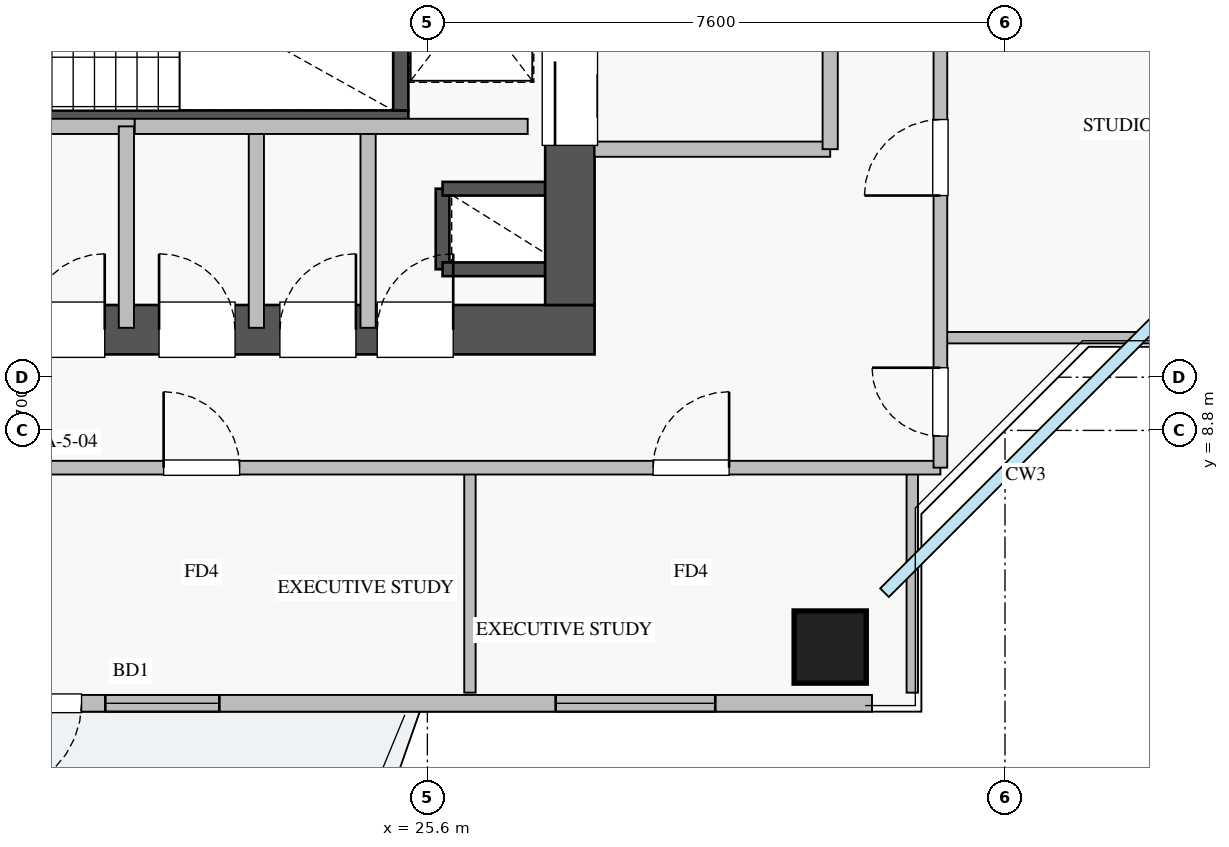
"""IFC4 building model, lengths in metres.
Left out: names, types, materials, properties, quantities, classifications, styles, units other than length and angle.
Written with IfcOpenShell. Run it as: python <this file> out.ifc"""

import sys

from ifc_helpers import new_model, si_unit, direction, frame, frame_2d, origin, origin_2d, place, context, subcontext, project, spatial, rectangle, extrude, source, transform, mapped, element, fill, save


model = new_model("IFC4")
c1 = context("Model", 3, precision=1e-05, world=origin(), true_north=direction((0.0, 1.0)))
c2 = subcontext(c1, "Body", "Model", "MODEL_VIEW")
j1 = project(units=[si_unit("LENGTHUNIT", "METRE"), si_unit("PLANEANGLEUNIT", "RADIAN")], contexts=[c1])
p1 = place(None, origin())
s1 = spatial("IfcSite", under=j1, at=p1, CompositionType="ELEMENT")
p2 = place(p1, origin())
s2 = spatial("IfcBuilding", under=s1, at=p2, CompositionType="ELEMENT")
p3 = place(p2, frame((0.0, 0.0, 182.75)))
s3 = spatial("IfcBuildingStorey", under=s2, at=p3, CompositionType="ELEMENT", Elevation=182.75)
p4 = place(p3, frame((25.8, 10.92, 0.0), z_axis=(0.0, 0.0, 1.0), x_axis=(0.0, 1.0, 0.0)))
e1 = element("IfcWall", 1, at=p4, inside=s3, PredefinedType="SHEAR", context=c2, shape_type="SweptSolid", body=[
    extrude(rectangle(XDim=1.06, YDim=0.18, at=frame_2d((0.53, 0.0))), origin(), (0.0, 0.0, 1.0), 3.03),
])
for number, where, z_axis, x_axis in (
    (2, (25.8, 11.98, 0.0), (0.0, 0.0, 1.0), (1.0, 0.0, 0.0)),
    (3, (25.8, 10.92, 0.0), (0.0, 0.0, 1.0), (1.0, 0.0, 0.0)),
):
    element("IfcWall", number, at=place(p3, frame(where, z_axis=z_axis, x_axis=x_axis)), inside=s3, PredefinedType="SHEAR", context=c2, shape_type="SweptSolid", body=[
        extrude(rectangle(XDim=1.35, YDim=0.18, at=frame_2d((0.675, 0.0))), origin(), (0.0, 0.0, 1.0), 3.03),
    ])
p5 = place(p3, frame((18.2, 12.91, 0.0), z_axis=(0.0, 0.0, 1.0), x_axis=(1.0, 0.0, 0.0)))
e4 = element("IfcWall", 4, at=p5, inside=s3, PredefinedType="SHEAR", context=c2, shape_type="SweptSolid", body=[
    extrude(rectangle(XDim=7.15, YDim=0.2, at=frame_2d((3.575, 0.0))), origin(), (0.0, 0.0, 1.0), 3.25),
])
p6 = place(p5, frame((0.35, 0.0, 0.0)))
e5 = element("IfcOpeningElement", 5, at=p6, cuts=e4, PredefinedType="OPENING", context=c2, shape_type="SweptSolid", body=[
    extrude(rectangle(XDim=1.1, YDim=2.05, at=frame_2d((0.55, 1.025))), frame((0.0, 0.11, 0.0), z_axis=(0.0, -1.0, 0.0), x_axis=(1.0, 0.0, 0.0)), (0.0, 0.0, 1.0), 0.22),
])
p7 = place(p3, frame((25.25, 13.01, 0.0), z_axis=(0.0, 0.0, 1.0), x_axis=(0.0, 1.0, 0.0)))
e6 = element("IfcWall", 6, at=p7, inside=s3, PredefinedType="SHEAR", context=c2, shape_type="SweptSolid", body=[
    extrude(rectangle(XDim=2.94, YDim=0.2, at=frame_2d((1.47, 0.0))), origin(), (0.0, 0.0, 1.0), 3.25),
])
p8 = place(p3, frame((10.2, 10.125, 0.0), z_axis=(0.0, 0.0, 1.0), x_axis=(1.0, 0.0, 0.0)))
e7 = element("IfcWall", 7, at=p8, inside=s3, PredefinedType="SHEAR", context=c2, shape_type="SweptSolid", body=[
    extrude(rectangle(XDim=17.6, YDim=0.65, at=frame_2d((8.8, 0.0))), origin(), (0.0, 0.0, 1.0), 3.25),
])
p9 = place(p8, frame((1.15, 0.0, 0.0)))
e8 = element("IfcOpeningElement", 8, at=p9, cuts=e7, PredefinedType="OPENING", context=c2, shape_type="SweptSolid", body=[
    extrude(rectangle(XDim=1.1, YDim=2.05, at=frame_2d((0.55, 1.025))), frame((0.0, 0.335, 0.0), z_axis=(0.0, -1.0, 0.0), x_axis=(1.0, 0.0, 0.0)), (0.0, 0.0, 1.0), 0.67),
])
p10 = place(p8, frame((8.3, 0.0, 0.0)))
e9 = element("IfcOpeningElement", 9, at=p10, cuts=e7, PredefinedType="OPENING", context=c2, shape_type="SweptSolid", body=[
    extrude(rectangle(XDim=1.1, YDim=2.05, at=frame_2d((0.55, 1.025))), frame((0.0, 0.335, 0.0), z_axis=(0.0, -1.0, 0.0), x_axis=(1.0, 0.0, 0.0)), (0.0, 0.0, 1.0), 0.67),
])
p11 = place(p8, frame((4.9, 0.0, 0.0)))
e10 = element("IfcOpeningElement", 10, at=p11, cuts=e7, PredefinedType="OPENING", context=c2, shape_type="SweptSolid", body=[
    extrude(rectangle(XDim=1.1, YDim=2.05, at=frame_2d((0.55, 1.025))), frame((0.0, 0.335, 0.0), z_axis=(0.0, -1.0, 0.0), x_axis=(1.0, 0.0, 0.0)), (0.0, 0.0, 1.0), 0.67),
])
p12 = place(p8, frame((14.74, 0.0, 0.0)))
e11 = element("IfcOpeningElement", 11, at=p12, cuts=e7, PredefinedType="OPENING", context=c2, shape_type="SweptSolid", body=[
    extrude(rectangle(XDim=1.0, YDim=2.05, at=frame_2d((0.5, 1.025))), frame((0.0, 0.335, 0.0), z_axis=(0.0, -1.0, 0.0), x_axis=(1.0, 0.0, 0.0)), (0.0, 0.0, 1.0), 0.67),
])
p13 = place(p8, frame((10.155, 0.0, 0.0)))
e12 = element("IfcOpeningElement", 12, at=p13, cuts=e7, PredefinedType="OPENING", context=c2, shape_type="SweptSolid", body=[
    extrude(rectangle(XDim=1.0, YDim=2.05, at=frame_2d((0.5, 1.025))), frame((0.0, 0.335, 0.0), z_axis=(0.0, -1.0, 0.0), x_axis=(1.0, 0.0, 0.0)), (0.0, 0.0, 1.0), 0.67),
])
p14 = place(p8, frame((11.87, 0.0, 0.0)))
e13 = element("IfcOpeningElement", 13, at=p14, cuts=e7, PredefinedType="OPENING", context=c2, shape_type="SweptSolid", body=[
    extrude(rectangle(XDim=1.0, YDim=2.05, at=frame_2d((0.5, 1.025))), frame((0.0, 0.335, 0.0), z_axis=(0.0, -1.0, 0.0), x_axis=(1.0, 0.0, 0.0)), (0.0, 0.0, 1.0), 0.67),
])
p15 = place(p8, frame((13.46, 0.0, 0.0)))
e14 = element("IfcOpeningElement", 14, at=p15, cuts=e7, PredefinedType="OPENING", context=c2, shape_type="SweptSolid", body=[
    extrude(rectangle(XDim=1.0, YDim=2.05, at=frame_2d((0.5, 1.025))), frame((0.0, 0.335, 0.0), z_axis=(0.0, -1.0, 0.0), x_axis=(1.0, 0.0, 0.0)), (0.0, 0.0, 1.0), 0.67),
])
p16 = place(p3, frame((27.475, 10.45, 0.0), z_axis=(0.0, 0.0, 1.0), x_axis=(0.0, 1.0, 0.0)))
e15 = element("IfcWall", 15, at=p16, inside=s3, PredefinedType="SHEAR", context=c2, shape_type="SweptSolid", body=[
    extrude(rectangle(XDim=5.9, YDim=0.65, at=frame_2d((2.95, 0.0))), origin(), (0.0, 0.0, 1.0), 3.25),
])
p17 = place(p16, frame((2.1, 0.0, 0.0)))
e16 = element("IfcOpeningElement", 16, at=p17, cuts=e15, PredefinedType="OPENING", context=c2, shape_type="SweptSolid", body=[
    extrude(rectangle(XDim=1.3, YDim=2.05, at=frame_2d((0.65, 1.025))), frame((0.0, 0.335, 0.0), z_axis=(0.0, -1.0, 0.0), x_axis=(1.0, 0.0, 0.0)), (0.0, 0.0, 1.0), 0.67),
])
m1 = source(origin(), c2, "Body", "SweptSolid", [
    extrude(rectangle(XDim=0.95, YDim=0.95, at=origin_2d()), origin(), (0.0, 0.0, 1.0), 3.25),
])
p18 = place(p3, frame((30.9, 5.95, 0.0), z_axis=(0.0, 0.0, 1.0), x_axis=(1.0, 0.0, 0.0)))
e17 = element("IfcColumn", 17, at=p18, inside=s3, PredefinedType="COLUMN", context=c2, shape_type="MappedRepresentation", body=[
    mapped(m1, transform((0.0, 0.0, 0.0), x_axis=(1.0, 0.0, 0.0), y_axis=(0.0, 1.0, 0.0), z_axis=(0.0, 0.0, 1.0), scale=1.0)),
])
p19 = place(p3, frame((6.55, 5.21, 0.0), z_axis=(0.0, 0.0, 1.0), x_axis=(1.0, 0.0, 0.0)))
e18 = element("IfcWall", 18, at=p19, inside=s3, PredefinedType="STANDARD", context=c2, shape_type="SweptSolid", body=[
    extrude(rectangle(XDim=24.9, YDim=0.22, at=frame_2d((12.45, 0.0))), origin(), (0.0, 0.0, 1.0), 2.57),
])
p20 = place(p19, frame((13.3, 0.0, 0.0)))
e19 = element("IfcOpeningElement", 19, at=p20, cuts=e18, PredefinedType="OPENING", context=c2, shape_type="SweptSolid", body=[
    extrude(rectangle(XDim=1.2, YDim=2.1, at=frame_2d((0.6, 1.05))), frame((0.0, 0.12, 0.0), z_axis=(0.0, -1.0, 0.0), x_axis=(1.0, 0.0, 0.0)), (0.0, 0.0, 1.0), 0.24),
])
p21 = place(p19, frame((3.455, 0.0, 0.9)))
e20 = element("IfcOpeningElement", 20, at=p21, cuts=e18, PredefinedType="OPENING", context=c2, shape_type="SweptSolid", body=[
    extrude(rectangle(XDim=2.4, YDim=1.5, at=frame_2d((1.2, 0.75))), frame((0.0, 0.12, 0.0), z_axis=(0.0, -1.0, 0.0), x_axis=(1.0, 0.0, 0.0)), (0.0, 0.0, 1.0), 0.24),
])
p22 = place(p19, frame((8.438, 0.0, 0.9)))
e21 = element("IfcOpeningElement", 21, at=p22, cuts=e18, PredefinedType="OPENING", context=c2, shape_type="SweptSolid", body=[
    extrude(rectangle(XDim=1.8, YDim=1.45, at=frame_2d((0.9, 0.725))), frame((0.0, 0.12, 0.0), z_axis=(0.0, -1.0, 0.0), x_axis=(1.0, 0.0, 0.0)), (0.0, 0.0, 1.0), 0.24),
])
p23 = place(p19, frame((14.813, 0.0, 0.9)))
e22 = element("IfcOpeningElement", 22, at=p23, cuts=e18, PredefinedType="OPENING", context=c2, shape_type="SweptSolid", body=[
    extrude(rectangle(XDim=1.5, YDim=1.45, at=frame_2d((0.75, 0.725))), frame((0.0, 0.12, 0.0), z_axis=(0.0, -1.0, 0.0), x_axis=(1.0, 0.0, 0.0)), (0.0, 0.0, 1.0), 0.24),
])
p24 = place(p19, frame((20.738, 0.0, 0.9)))
e23 = element("IfcOpeningElement", 23, at=p24, cuts=e18, PredefinedType="OPENING", context=c2, shape_type="SweptSolid", body=[
    extrude(rectangle(XDim=2.1, YDim=1.48, at=frame_2d((1.05, 0.74))), frame((0.0, 0.12, 0.0), z_axis=(0.0, -1.0, 0.0), x_axis=(1.0, 0.0, 0.0)), (0.0, 0.0, 1.0), 0.24),
])
p25 = place(p3, frame((27.8, 12.5, 0.0), z_axis=(0.0, 0.0, 1.0), x_axis=(1.0, 0.0, 0.0)))
e24 = element("IfcWall", 24, at=p25, inside=s3, PredefinedType="PARTITIONING", context=c2, shape_type="SweptSolid", body=[
    extrude(rectangle(XDim=3.1, YDim=0.2, at=frame_2d((1.55, 0.0))), origin(), (0.0, 0.0, 1.0), 3.03),
])
p26 = place(p3, frame((30.9, 12.5, 0.0), z_axis=(0.0, 0.0, 1.0), x_axis=(0.0, 1.0, 0.0)))
e25 = element("IfcWall", 25, at=p26, inside=s3, PredefinedType="PARTITIONING", context=c2, shape_type="SweptSolid", body=[
    extrude(rectangle(XDim=3.9, YDim=0.2, at=frame_2d((1.95, 0.0))), origin(), (0.0, 0.0, 1.0), 3.03),
])
p27 = place(p26, frame((1.4, 0.0, 0.0)))
e26 = element("IfcOpeningElement", 26, at=p27, cuts=e25, PredefinedType="OPENING", context=c2, shape_type="SweptSolid", body=[
    extrude(rectangle(XDim=1.1, YDim=2.05, at=frame_2d((0.55, 1.025))), frame((0.0, 0.11, 0.0), z_axis=(0.0, -1.0, 0.0), x_axis=(1.0, 0.0, 0.0)), (0.0, 0.0, 1.0), 0.22),
])
p28 = place(p3, frame((24.82, 10.15, 0.0), z_axis=(0.0, 0.0, 1.0), x_axis=(0.0, 1.0, 0.0)))
e27 = element("IfcWall", 27, at=p28, inside=s3, PredefinedType="PARTITIONING", context=c2, shape_type="SweptSolid", body=[
    extrude(rectangle(XDim=2.65, YDim=0.2, at=frame_2d((1.325, 0.0))), origin(), (0.0, 0.0, 1.0), 3.03),
])
p29 = place(p3, frame((19.88, 12.8, 0.0), z_axis=(0.0, 0.0, 1.0), x_axis=(1.0, 0.0, 0.0)))
e28 = element("IfcWall", 28, at=p29, inside=s3, PredefinedType="PARTITIONING", context=c2, shape_type="SweptSolid", body=[
    extrude(rectangle(XDim=1.87, YDim=0.2, at=frame_2d((0.935, 0.0))), origin(), (0.0, 0.0, 1.0), 3.03),
])
for number, where, z_axis, x_axis in (
    (29, (21.64, 10.15, 0.0), (0.0, 0.0, 1.0), (0.0, 1.0, 0.0)),
    (30, (23.35, 10.15, 0.0), (0.0, 0.0, 1.0), (0.0, 1.0, 0.0)),
):
    element("IfcWall", number, at=place(p3, frame(where, z_axis=z_axis, x_axis=x_axis)), inside=s3, PredefinedType="PARTITIONING", context=c2, shape_type="SweptSolid", body=[
        extrude(rectangle(XDim=2.65, YDim=0.2, at=frame_2d((1.325, 0.0))), origin(), (0.0, 0.0, 1.0), 3.03),
    ])
p30 = place(p3, frame((21.75, 12.8, 0.0), z_axis=(0.0, 0.0, 1.0), x_axis=(1.0, 0.0, 0.0)))
e31 = element("IfcWall", 31, at=p30, inside=s3, PredefinedType="PARTITIONING", context=c2, shape_type="SweptSolid", body=[
    extrude(rectangle(XDim=5.17, YDim=0.2, at=frame_2d((2.585, 0.0))), origin(), (0.0, 0.0, 1.0), 3.03),
])
for number, where, z_axis, x_axis in (
    (32, (26.16, 5.35, 0.0), (0.0, 0.0, 1.0), (0.0, 1.0, 0.0)),
    (33, (31.98, 5.35, 0.0), (0.0, 0.0, 1.0), (0.0, 1.0, 0.0)),
):
    element("IfcWall", number, at=place(p3, frame(where, z_axis=z_axis, x_axis=x_axis)), inside=s3, PredefinedType="PARTITIONING", context=c2, shape_type="SweptSolid", body=[
        extrude(rectangle(XDim=2.96, YDim=0.15, at=frame_2d((1.48, 0.0))), origin(), (0.0, 0.0, 1.0), 3.03),
    ])
p31 = place(p3, frame((8.72, 8.31, 0.0), z_axis=(0.0, 0.0, 1.0), x_axis=(1.0, 0.0, 0.0)))
e34 = element("IfcWall", 34, at=p31, inside=s3, PredefinedType="PARTITIONING", context=c2, shape_type="SweptSolid", body=[
    extrude(rectangle(XDim=23.63, YDim=0.18, at=frame_2d((11.815, 0.0))), origin(), (0.0, 0.0, 1.0), 3.03),
])
p32 = place(p31, frame((1.985, 0.0, 0.0)))
e35 = element("IfcOpeningElement", 35, at=p32, cuts=e34, PredefinedType="OPENING", context=c2, shape_type="SweptSolid", body=[
    extrude(rectangle(XDim=1.0, YDim=2.05, at=frame_2d((0.5, 1.025))), frame((0.0, 0.1, 0.0), z_axis=(0.0, -1.0, 0.0), x_axis=(1.0, 0.0, 0.0)), (0.0, 0.0, 1.0), 0.2),
])
p33 = place(p31, frame((7.175, 0.0, 0.0)))
e36 = element("IfcOpeningElement", 36, at=p33, cuts=e34, PredefinedType="OPENING", context=c2, shape_type="SweptSolid", body=[
    extrude(rectangle(XDim=1.0, YDim=2.05, at=frame_2d((0.5, 1.025))), frame((0.0, 0.1, 0.0), z_axis=(0.0, -1.0, 0.0), x_axis=(1.0, 0.0, 0.0)), (0.0, 0.0, 1.0), 0.2),
])
p34 = place(p31, frame((13.41, 0.0, 0.0)))
e37 = element("IfcOpeningElement", 37, at=p34, cuts=e34, PredefinedType="OPENING", context=c2, shape_type="SweptSolid", body=[
    extrude(rectangle(XDim=1.0, YDim=2.05, at=frame_2d((0.5, 1.025))), frame((0.0, 0.1, 0.0), z_axis=(0.0, -1.0, 0.0), x_axis=(1.0, 0.0, 0.0)), (0.0, 0.0, 1.0), 0.2),
])
p35 = place(p31, frame((19.85, 0.0, 0.0)))
e38 = element("IfcOpeningElement", 38, at=p35, cuts=e34, PredefinedType="OPENING", context=c2, shape_type="SweptSolid", body=[
    extrude(rectangle(XDim=1.0, YDim=2.05, at=frame_2d((0.5, 1.025))), frame((0.0, 0.1, 0.0), z_axis=(0.0, -1.0, 0.0), x_axis=(1.0, 0.0, 0.0)), (0.0, 0.0, 1.0), 0.2),
])
p36 = place(p3, frame((32.35, 10.02, 0.0), z_axis=(0.0, 0.0, 1.0), x_axis=(1.0, 0.0, 0.0)))
e39 = element("IfcWall", 39, at=p36, inside=s3, PredefinedType="PARTITIONING", context=c2, shape_type="SweptSolid", body=[
    extrude(rectangle(XDim=4.3, YDim=0.15, at=frame_2d((2.15, 0.0))), origin(), (0.0, 0.0, 1.0), 3.03),
])
p37 = place(p3, frame((32.35, 8.31, 0.0), z_axis=(0.0, 0.0, 1.0), x_axis=(0.0, 1.0, 0.0)))
e40 = element("IfcWall", 40, at=p37, inside=s3, PredefinedType="PARTITIONING", context=c2, shape_type="SweptSolid", body=[
    extrude(rectangle(XDim=29.37, YDim=0.18, at=frame_2d((14.685, 0.0))), origin(), (0.0, 0.0, 1.0), 3.03),
])
p38 = place(p37, frame((28.06, 0.0, 0.0)))
e41 = element("IfcOpeningElement", 41, at=p38, cuts=e40, PredefinedType="OPENING", context=c2, shape_type="SweptSolid", body=[
    extrude(rectangle(XDim=0.9, YDim=2.05, at=frame_2d((0.45, 1.025))), frame((0.0, 0.1, 0.0), z_axis=(0.0, -1.0, 0.0), x_axis=(1.0, 0.0, 0.0)), (0.0, 0.0, 1.0), 0.2),
])
p39 = place(p37, frame((0.415, 0.0, 0.0)))
e42 = element("IfcOpeningElement", 42, at=p39, cuts=e40, PredefinedType="OPENING", context=c2, shape_type="SweptSolid", body=[
    extrude(rectangle(XDim=0.9, YDim=2.05, at=frame_2d((0.45, 1.025))), frame((0.0, 0.1, 0.0), z_axis=(0.0, -1.0, 0.0), x_axis=(1.0, 0.0, 0.0)), (0.0, 0.0, 1.0), 0.2),
])
p40 = place(p37, frame((3.58, 0.0, 0.0)))
e43 = element("IfcOpeningElement", 43, at=p40, cuts=e40, PredefinedType="OPENING", context=c2, shape_type="SweptSolid", body=[
    extrude(rectangle(XDim=1.0, YDim=2.05, at=frame_2d((0.5, 1.025))), frame((0.0, 0.1, 0.0), z_axis=(0.0, -1.0, 0.0), x_axis=(1.0, 0.0, 0.0)), (0.0, 0.0, 1.0), 0.2),
])
p41 = place(p37, frame((12.305, 0.0, 0.0)))
e44 = element("IfcOpeningElement", 44, at=p41, cuts=e40, PredefinedType="OPENING", context=c2, shape_type="SweptSolid", body=[
    extrude(rectangle(XDim=1.0, YDim=2.05, at=frame_2d((0.5, 1.025))), frame((0.0, 0.1, 0.0), z_axis=(0.0, -1.0, 0.0), x_axis=(1.0, 0.0, 0.0)), (0.0, 0.0, 1.0), 0.2),
])
p42 = place(p37, frame((20.835, 0.0, 0.0)))
e45 = element("IfcOpeningElement", 45, at=p42, cuts=e40, PredefinedType="OPENING", context=c2, shape_type="SweptSolid", body=[
    extrude(rectangle(XDim=1.0, YDim=2.05, at=frame_2d((0.5, 1.025))), frame((0.0, 0.1, 0.0), z_axis=(0.0, -1.0, 0.0), x_axis=(1.0, 0.0, 0.0)), (0.0, 0.0, 1.0), 0.2),
])
m2 = source(origin(), c2, "Body", "SweptSolid", [
    extrude(rectangle(XDim=1.2, YDim=2.1, at=frame_2d((0.6, 1.05))), frame((0.0, 0.025, 0.0), z_axis=(0.0, -1.0, 0.0), x_axis=(1.0, 0.0, 0.0)), (0.0, 0.0, 1.0), 0.05),
])
p43 = place(p20, frame((1.2, 0.0, 0.0), z_axis=(0.0, 0.0, 1.0), x_axis=(-1.0, 0.0, 0.0)))
e46 = element("IfcDoor", 46, at=p43, inside=s3, OperationType="SINGLE_SWING_LEFT", PredefinedType="DOOR", context=c2, shape_type="MappedRepresentation", body=[
    mapped(m2, transform((0.0, 0.0, 0.0), x_axis=(1.0, 0.0, 0.0), y_axis=(0.0, 1.0, 0.0), z_axis=(0.0, 0.0, 1.0), scale=1.0)),
])
fill(e19, e46)
m3 = source(origin(), c2, "Body", "SweptSolid", [
    extrude(rectangle(XDim=1.5, YDim=1.45, at=frame_2d((0.75, 0.725))), frame((0.0, 0.03, 0.0), z_axis=(0.0, -1.0, 0.0), x_axis=(1.0, 0.0, 0.0)), (0.0, 0.0, 1.0), 0.06),
])
p44 = place(p23, origin())
e47 = element("IfcWindow", 47, at=p44, inside=s3, PartitioningType="DOUBLE_PANEL_VERTICAL", PredefinedType="WINDOW", context=c2, shape_type="MappedRepresentation", body=[
    mapped(m3, transform((0.0, 0.0, 0.0), x_axis=(1.0, 0.0, 0.0), y_axis=(0.0, 1.0, 0.0), z_axis=(0.0, 0.0, 1.0), scale=1.0)),
])
fill(e22, e47)
m4 = source(origin(), c2, "Body", "SweptSolid", [
    extrude(rectangle(XDim=2.1, YDim=1.48, at=frame_2d((1.05, 0.74))), frame((0.0, 0.03, 0.0), z_axis=(0.0, -1.0, 0.0), x_axis=(1.0, 0.0, 0.0)), (0.0, 0.0, 1.0), 0.06),
])
p45 = place(p24, origin())
e48 = element("IfcWindow", 48, at=p45, inside=s3, PartitioningType="TRIPLE_PANEL_VERTICAL", PredefinedType="WINDOW", context=c2, shape_type="MappedRepresentation", body=[
    mapped(m4, transform((0.0, 0.0, 0.0), x_axis=(1.0, 0.0, 0.0), y_axis=(0.0, 1.0, 0.0), z_axis=(0.0, 0.0, 1.0), scale=1.0)),
])
fill(e23, e48)
m5 = source(origin(), c2, "Body", "SweptSolid", [
    extrude(rectangle(XDim=1.3, YDim=2.05, at=frame_2d((0.65, 1.025))), frame((0.0, 0.025, 0.0), z_axis=(0.0, -1.0, 0.0), x_axis=(1.0, 0.0, 0.0)), (0.0, 0.0, 1.0), 0.05),
])
p46 = place(p17, origin())
e49 = element("IfcDoor", 49, at=p46, inside=s3, OperationType="SLIDING_TO_RIGHT", PredefinedType="DOOR", context=c2, shape_type="MappedRepresentation", body=[
    mapped(m5, transform((0.0, 0.0, 0.0), x_axis=(1.0, 0.0, 0.0), y_axis=(0.0, 1.0, 0.0), z_axis=(0.0, 0.0, 1.0), scale=1.0)),
])
fill(e16, e49)
m6 = source(origin(), c2, "Body", "SweptSolid", [
    extrude(rectangle(XDim=1.0, YDim=2.05, at=frame_2d((0.5, 1.025))), frame((0.0, 0.025, 0.0), z_axis=(0.0, -1.0, 0.0), x_axis=(1.0, 0.0, 0.0)), (0.0, 0.0, 1.0), 0.05),
])
p47 = place(p12, origin())
e50 = element("IfcDoor", 50, at=p47, inside=s3, OperationType="SINGLE_SWING_RIGHT", PredefinedType="DOOR", context=c2, shape_type="MappedRepresentation", body=[
    mapped(m6, transform((0.0, 0.0, 0.0), x_axis=(1.0, 0.0, 0.0), y_axis=(0.0, 1.0, 0.0), z_axis=(0.0, 0.0, 1.0), scale=1.0)),
])
fill(e11, e50)
p48 = place(p13, origin())
e51 = element("IfcDoor", 51, at=p48, inside=s3, OperationType="SINGLE_SWING_RIGHT", PredefinedType="DOOR", context=c2, shape_type="MappedRepresentation", body=[
    mapped(m6, transform((0.0, 0.0, 0.0), x_axis=(1.0, 0.0, 0.0), y_axis=(0.0, 1.0, 0.0), z_axis=(0.0, 0.0, 1.0), scale=1.0)),
])
fill(e12, e51)
p49 = place(p14, origin())
e52 = element("IfcDoor", 52, at=p49, inside=s3, OperationType="SINGLE_SWING_LEFT", PredefinedType="DOOR", context=c2, shape_type="MappedRepresentation", body=[
    mapped(m6, transform((0.0, 0.0, 0.0), x_axis=(1.0, 0.0, 0.0), y_axis=(0.0, 1.0, 0.0), z_axis=(0.0, 0.0, 1.0), scale=1.0)),
])
fill(e13, e52)
p50 = place(p15, origin())
e53 = element("IfcDoor", 53, at=p50, inside=s3, OperationType="SINGLE_SWING_RIGHT", PredefinedType="DOOR", context=c2, shape_type="MappedRepresentation", body=[
    mapped(m6, transform((0.0, 0.0, 0.0), x_axis=(1.0, 0.0, 0.0), y_axis=(0.0, 1.0, 0.0), z_axis=(0.0, 0.0, 1.0), scale=1.0)),
])
fill(e14, e53)
p51 = place(p34, origin())
e54 = element("IfcDoor", 54, at=p51, inside=s3, OperationType="SINGLE_SWING_LEFT", PredefinedType="DOOR", context=c2, shape_type="MappedRepresentation", body=[
    mapped(m6, transform((0.0, 0.0, 0.0), x_axis=(1.0, 0.0, 0.0), y_axis=(0.0, 1.0, 0.0), z_axis=(0.0, 0.0, 1.0), scale=1.0)),
])
fill(e37, e54)
p52 = place(p35, origin())
e55 = element("IfcDoor", 55, at=p52, inside=s3, OperationType="SINGLE_SWING_RIGHT", PredefinedType="DOOR", context=c2, shape_type="MappedRepresentation", body=[
    mapped(m6, transform((0.0, 0.0, 0.0), x_axis=(1.0, 0.0, 0.0), y_axis=(0.0, 1.0, 0.0), z_axis=(0.0, 0.0, 1.0), scale=1.0)),
])
fill(e38, e55)
m7 = source(origin(), c2, "Body", "SweptSolid", [
    extrude(rectangle(XDim=0.9, YDim=2.05, at=frame_2d((0.45, 1.025))), frame((0.0, 0.025, 0.0), z_axis=(0.0, -1.0, 0.0), x_axis=(1.0, 0.0, 0.0)), (0.0, 0.0, 1.0), 0.05),
])
p53 = place(p39, origin())
e56 = element("IfcDoor", 56, at=p53, inside=s3, OperationType="SINGLE_SWING_RIGHT", PredefinedType="DOOR", context=c2, shape_type="MappedRepresentation", body=[
    mapped(m7, transform((0.0, 0.0, 0.0), x_axis=(1.0, 0.0, 0.0), y_axis=(0.0, 1.0, 0.0), z_axis=(0.0, 0.0, 1.0), scale=1.0)),
])
fill(e42, e56)
p54 = place(p40, origin())
e57 = element("IfcDoor", 57, at=p54, inside=s3, OperationType="SINGLE_SWING_LEFT", PredefinedType="DOOR", context=c2, shape_type="MappedRepresentation", body=[
    mapped(m6, transform((0.0, 0.0, 0.0), x_axis=(1.0, 0.0, 0.0), y_axis=(0.0, 1.0, 0.0), z_axis=(0.0, 0.0, 1.0), scale=1.0)),
])
fill(e43, e57)
save(model, sys.argv[1])
